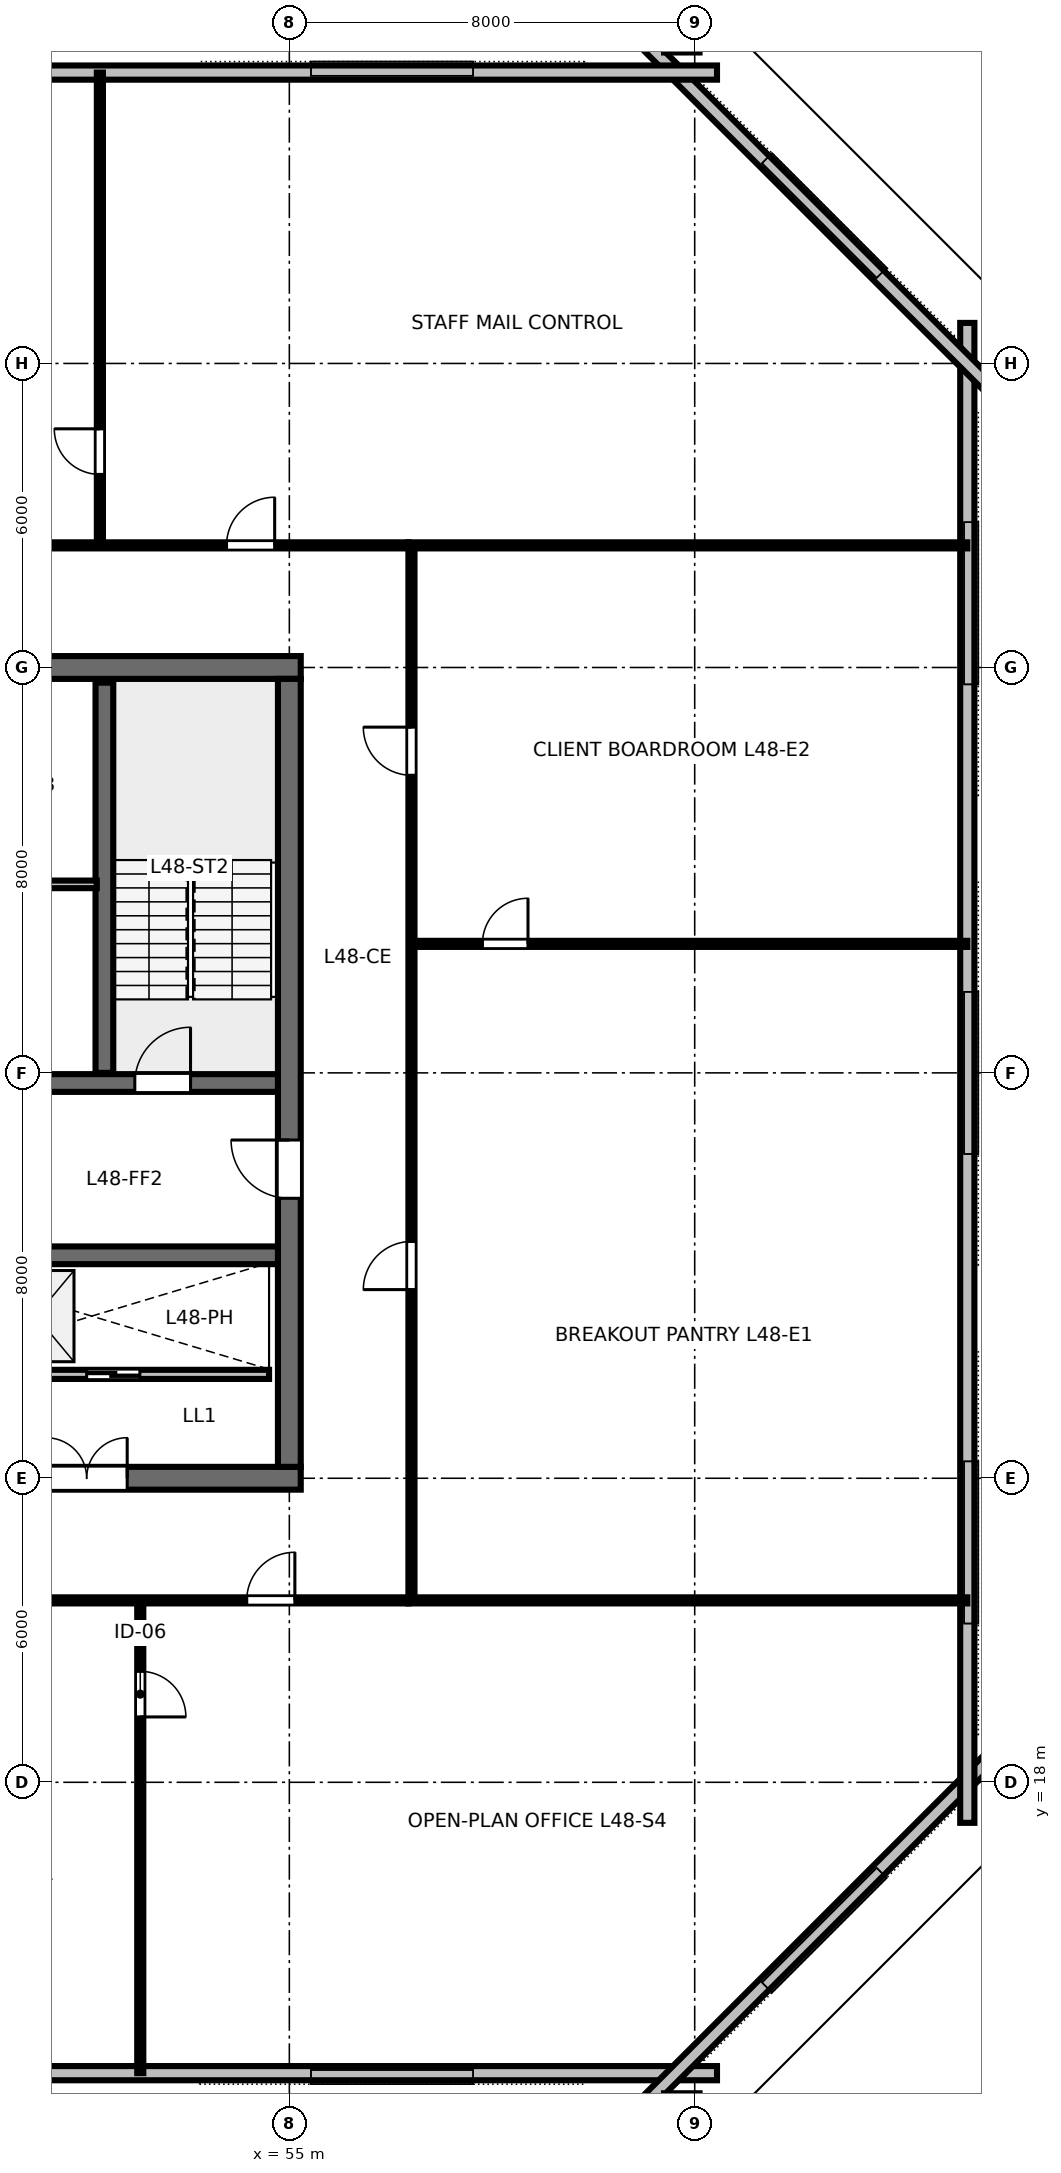
"""IFC4 building model, lengths in metres.
Left out: names, types, materials, properties, quantities, classifications, styles, units other than length and angle.
Written with IfcOpenShell. Run it as: python <this file> out.ifc"""

import sys

from ifc_helpers import new_model, si_unit, direction, frame, frame_2d, origin, origin_2d, place, context, subcontext, project, spatial, rectangle, hollow_rectangle, i_section, extrude, element, fill, save


model = new_model("IFC4")
c1 = context("Model", 3, precision=1e-05, world=origin(), true_north=direction((0.0, 1.0)))
c2 = subcontext(c1, "Body", "Model", "MODEL_VIEW")
j1 = project(units=[si_unit("LENGTHUNIT", "METRE"), si_unit("PLANEANGLEUNIT", "RADIAN")], contexts=[c1])
p1 = place(None, origin())
s1 = spatial("IfcSite", under=j1, at=p1, CompositionType="ELEMENT")
p2 = place(p1, origin())
s2 = spatial("IfcBuilding", under=s1, at=p2, CompositionType="ELEMENT")
p3 = place(p2, frame((0.0, 0.0, 184.2)))
s3 = spatial("IfcBuildingStorey", under=s2, at=p3, CompositionType="ELEMENT", Elevation=184.2)
p4 = place(p3, frame((36.775, 24.0, 0.0), z_axis=(0.0, 0.0, 1.0), x_axis=(1.0, 0.0, 0.0)))
e1 = element("IfcWall", 1, at=p4, inside=s3, PredefinedType="SHEAR", context=c2, shape_type="SweptSolid", body=[
    extrude(rectangle(XDim=18.45, YDim=0.45, at=frame_2d((9.225, 0.0))), origin(), (0.0, 0.0, 1.0), 3.36),
])
p5 = place(p4, frame((13.425, 0.0, 0.0)))
e2 = element("IfcOpeningElement", 2, at=p5, cuts=e1, PredefinedType="OPENING", context=c2, shape_type="SweptSolid", body=[
    extrude(rectangle(XDim=1.6, YDim=2.15, at=frame_2d((0.8, 1.075))), frame((0.0, 0.235, 0.0), z_axis=(0.0, -1.0, 0.0), x_axis=(1.0, 0.0, 0.0)), (0.0, 0.0, 1.0), 0.47),
])
p6 = place(p3, frame((36.775, 40.0, 0.0), z_axis=(0.0, 0.0, 1.0), x_axis=(1.0, 0.0, 0.0)))
e3 = element("IfcWall", 3, at=p6, inside=s3, PredefinedType="SHEAR", context=c2, shape_type="SweptSolid", body=[
    extrude(rectangle(XDim=18.45, YDim=0.45, at=frame_2d((9.225, 0.0))), origin(), (0.0, 0.0, 1.0), 3.36),
])
p7 = place(p6, frame((8.725, 0.0, 0.0)))
e4 = element("IfcOpeningElement", 4, at=p7, cuts=e3, PredefinedType="OPENING", context=c2, shape_type="SweptSolid", body=[
    extrude(rectangle(XDim=1.0, YDim=2.15, at=frame_2d((0.5, 1.075))), frame((0.0, 0.235, 0.0), z_axis=(0.0, -1.0, 0.0), x_axis=(1.0, 0.0, 0.0)), (0.0, 0.0, 1.0), 0.47),
])
p8 = place(p3, frame((55.0, 24.225, 0.0), z_axis=(0.0, 0.0, 1.0), x_axis=(0.0, 1.0, 0.0)))
e5 = element("IfcWall", 5, at=p8, inside=s3, PredefinedType="SHEAR", context=c2, shape_type="SweptSolid", body=[
    extrude(rectangle(XDim=15.55, YDim=0.45, at=frame_2d((7.775, 0.0))), origin(), (0.0, 0.0, 1.0), 3.36),
])
p9 = place(p8, frame((5.3, 0.0, 0.0)))
e6 = element("IfcOpeningElement", 6, at=p9, cuts=e5, PredefinedType="OPENING", context=c2, shape_type="SweptSolid", body=[
    extrude(rectangle(XDim=1.15, YDim=2.15, at=frame_2d((0.575, 1.075))), frame((0.0, 0.235, 0.0), z_axis=(0.0, -1.0, 0.0), x_axis=(1.0, 0.0, 0.0)), (0.0, 0.0, 1.0), 0.47),
])
p10 = place(p3, frame((37.225, 31.8, 0.0), z_axis=(0.0, 0.0, 1.0), x_axis=(1.0, 0.0, 0.0)))
e7 = element("IfcWall", 7, at=p10, inside=s3, PredefinedType="SHEAR", context=c2, shape_type="SweptSolid", body=[
    extrude(rectangle(XDim=17.55, YDim=0.35, at=frame_2d((8.775, 0.0))), origin(), (0.0, 0.0, 1.0), 3.36),
])
p11 = place(p10, frame((0.825, 0.0, 0.0)))
e8 = element("IfcOpeningElement", 8, at=p11, cuts=e7, PredefinedType="OPENING", context=c2, shape_type="SweptSolid", body=[
    extrude(rectangle(XDim=1.1, YDim=2.15, at=frame_2d((0.55, 1.075))), frame((0.0, 0.185, 0.0), z_axis=(0.0, -1.0, 0.0), x_axis=(1.0, 0.0, 0.0)), (0.0, 0.0, 1.0), 0.37),
])
p12 = place(p10, frame((14.725, 0.0, 0.0)))
e9 = element("IfcOpeningElement", 9, at=p12, cuts=e7, PredefinedType="OPENING", context=c2, shape_type="SweptSolid", body=[
    extrude(rectangle(XDim=1.1, YDim=2.15, at=frame_2d((0.55, 1.075))), frame((0.0, 0.185, 0.0), z_axis=(0.0, -1.0, 0.0), x_axis=(1.0, 0.0, 0.0)), (0.0, 0.0, 1.0), 0.37),
])
p13 = place(p3, frame((37.225, 28.4, 0.0), z_axis=(0.0, 0.0, 1.0), x_axis=(1.0, 0.0, 0.0)))
e10 = element("IfcWall", 10, at=p13, inside=s3, PredefinedType="SHEAR", context=c2, shape_type="SweptSolid", body=[
    extrude(rectangle(XDim=17.55, YDim=0.35, at=frame_2d((8.775, 0.0))), origin(), (0.0, 0.0, 1.0), 3.36),
])
p14 = place(p3, frame((62.745, 11.438, 0.0), z_axis=(-0.252686968591, 0.187893668889, 0.949128687321), x_axis=(-0.596699148139, -0.802465031394, 0.0)))
e11 = element("IfcColumn", 11, at=p14, inside=s3, PredefinedType="COLUMN", context=c2, shape_type="SweptSolid", body=[
    extrude(hollow_rectangle(XDim=0.7, YDim=0.85, WallThickness=0.04, at=origin_2d()), origin(), (0.0, 0.0, 1.0), 3.538),
])
p15 = place(p3, frame((69.146, 17.816, 0.0), z_axis=(-0.221678120535, 0.219053075792, 0.950197116846), x_axis=(0.67588069394, -0.66787712075, 0.311649545384)))
e12 = element("IfcColumn", 12, at=p15, inside=s3, PredefinedType="COLUMN", context=c2, shape_type="SweptSolid", body=[
    extrude(hollow_rectangle(XDim=0.7, YDim=0.85, WallThickness=0.04, at=origin_2d()), origin(), (0.0, 0.0, 1.0), 3.534),
])
p16 = place(p3, frame((69.04, 32.0, 0.0), z_axis=(-0.226255694856, 0.0, 0.974067944522), x_axis=(0.974067944522, 0.0, 0.226255694856)))
e13 = element("IfcColumn", 13, at=p16, inside=s3, PredefinedType="COLUMN", context=c2, shape_type="SweptSolid", body=[
    extrude(i_section(OverallWidth=0.406, OverallDepth=0.425, WebThickness=0.033, FlangeThickness=0.052, FilletRadius=0.025, at=origin_2d()), origin(), (0.0, 0.0, 1.0), 3.448),
])
p17 = place(p3, frame((69.146, 46.184, 0.0), z_axis=(-0.221678120535, -0.219053075792, 0.950197116846), x_axis=(0.67588069394, 0.66787712075, 0.311649545384)))
e14 = element("IfcColumn", 14, at=p17, inside=s3, PredefinedType="COLUMN", context=c2, shape_type="SweptSolid", body=[
    extrude(hollow_rectangle(XDim=0.7, YDim=0.85, WallThickness=0.04, at=origin_2d()), origin(), (0.0, 0.0, 1.0), 3.534),
])
p18 = place(p3, frame((62.745, 52.562, 0.0), z_axis=(-0.252686968591, -0.187893668889, 0.949128687321), x_axis=(0.596699148139, -0.802465031394, 0.0)))
e15 = element("IfcColumn", 15, at=p18, inside=s3, PredefinedType="COLUMN", context=c2, shape_type="SweptSolid", body=[
    extrude(hollow_rectangle(XDim=0.7, YDim=0.85, WallThickness=0.04, at=origin_2d()), origin(), (0.0, 0.0, 1.0), 3.538),
])
p19 = place(p3, frame((28.56, 12.26, 0.0), z_axis=(0.0, 0.0, 1.0), x_axis=(1.0, 0.0, 0.0)))
e16 = element("IfcWall", 16, at=p19, inside=s3, PredefinedType="STANDARD", context=c2, shape_type="SweptSolid", body=[
    extrude(rectangle(XDim=34.88, YDim=0.28, at=frame_2d((17.44, 0.0))), origin(), (0.0, 0.0, 1.0), 2.817),
])
p20 = place(p3, frame((62.054, 11.686, 0.0), z_axis=(0.0, 0.0, 1.0), x_axis=(0.707106781187, 0.707106781187, 0.0)))
e17 = element("IfcWall", 17, at=p20, inside=s3, PredefinedType="STANDARD", context=c2, shape_type="SweptSolid", body=[
    extrude(rectangle(XDim=9.757, YDim=0.28, at=frame_2d((4.879, 0.0))), origin(), (0.0, 0.0, 1.0), 3.36),
])
p21 = place(p3, frame((68.38, 17.2, 0.0), z_axis=(0.0, 0.0, 1.0), x_axis=(0.0, 1.0, 0.0)))
e18 = element("IfcWall", 18, at=p21, inside=s3, PredefinedType="STANDARD", context=c2, shape_type="SweptSolid", body=[
    extrude(rectangle(XDim=29.6, YDim=0.28, at=frame_2d((14.8, 0.0))), origin(), (0.0, 0.0, 1.0), 2.817),
])
p22 = place(p3, frame((68.954, 45.415, 0.0), z_axis=(0.0, 0.0, 1.0), x_axis=(-0.707106781187, 0.707106781187, 0.0)))
e19 = element("IfcWall", 19, at=p22, inside=s3, PredefinedType="STANDARD", context=c2, shape_type="SweptSolid", body=[
    extrude(rectangle(XDim=9.757, YDim=0.28, at=frame_2d((4.879, 0.0))), origin(), (0.0, 0.0, 1.0), 3.36),
])
p23 = place(p3, frame((63.44, 51.74, 0.0), z_axis=(0.0, 0.0, 1.0), x_axis=(-1.0, 0.0, 0.0)))
e20 = element("IfcWall", 20, at=p23, inside=s3, PredefinedType="STANDARD", context=c2, shape_type="SweptSolid", body=[
    extrude(rectangle(XDim=34.88, YDim=0.28, at=frame_2d((17.44, 0.0))), origin(), (0.0, 0.0, 1.0), 2.817),
])
p24 = place(p3, frame((51.35, 32.0, 0.0), z_axis=(0.0, 0.0, 1.0), x_axis=(0.0, 1.0, 0.0)))
e21 = element("IfcWall", 21, at=p24, inside=s3, PredefinedType="SHEAR", context=c2, shape_type="SweptSolid", body=[
    extrude(rectangle(XDim=7.7, YDim=0.35, at=frame_2d((3.85, 0.0))), origin(), (0.0, 0.0, 1.0), 3.6),
])
p25 = place(p3, frame((40.8, 35.72, 0.0), z_axis=(0.0, 0.0, 1.0), x_axis=(1.0, 0.0, 0.0)))
e22 = element("IfcWall", 22, at=p25, inside=s3, PredefinedType="PARTITIONING", context=c2, shape_type="SweptSolid", body=[
    extrude(rectangle(XDim=10.4, YDim=0.15, at=frame_2d((5.2, 0.0))), origin(), (0.0, 0.0, 1.0), 3.36),
])
p26 = place(p25, frame((4.9, 0.0, 0.0)))
e23 = element("IfcOpeningElement", 23, at=p26, cuts=e22, PredefinedType="OPENING", context=c2, shape_type="SweptSolid", body=[
    extrude(rectangle(XDim=0.9, YDim=2.15, at=frame_2d((0.45, 1.075))), frame((0.0, 0.085, 0.0), z_axis=(0.0, -1.0, 0.0), x_axis=(1.0, 0.0, 0.0)), (0.0, 0.0, 1.0), 0.17),
])
p27 = place(p3, frame((47.6, 26.05, 0.0), z_axis=(0.0, 0.0, 1.0), x_axis=(1.0, 0.0, 0.0)))
e24 = element("IfcWall", 24, at=p27, inside=s3, PredefinedType="PARTITIONING", context=c2, shape_type="SweptSolid", body=[
    extrude(rectangle(XDim=7.0, YDim=0.18, at=frame_2d((3.5, 0.0))), origin(), (0.0, 0.0, 1.0), 3.36),
])
p28 = place(p27, frame((1.2, 0.0, 0.0)))
e25 = element("IfcOpeningElement", 25, at=p28, cuts=e24, PredefinedType="OPENING", context=c2, shape_type="SweptSolid", body=[
    extrude(rectangle(XDim=1.05, YDim=2.15, at=frame_2d((0.525, 1.075))), frame((0.0, 0.1, 0.0), z_axis=(0.0, -1.0, 0.0), x_axis=(1.0, 0.0, 0.0)), (0.0, 0.0, 1.0), 0.2),
])
p29 = place(p27, frame((3.4, 0.0, 0.0)))
e26 = element("IfcOpeningElement", 26, at=p29, cuts=e24, PredefinedType="OPENING", context=c2, shape_type="SweptSolid", body=[
    extrude(rectangle(XDim=1.05, YDim=2.15, at=frame_2d((0.525, 1.075))), frame((0.0, 0.1, 0.0), z_axis=(0.0, -1.0, 0.0), x_axis=(1.0, 0.0, 0.0)), (0.0, 0.0, 1.0), 0.2),
])
p30 = place(p3, frame((52.058, 21.59, 0.0), z_axis=(0.0, 0.0, 1.0), x_axis=(0.0, -1.0, 0.0)))
e27 = element("IfcWall", 27, at=p30, inside=s3, PredefinedType="PARTITIONING", context=c2, shape_type="SweptSolid", body=[
    extrude(rectangle(XDim=9.33, YDim=0.12, at=frame_2d((4.665, 0.0))), origin(), (0.0, 0.0, 1.0), 2.64),
])
p31 = place(p30, frame((1.4, 0.0, 0.0)))
e28 = element("IfcOpeningElement", 28, at=p31, cuts=e27, PredefinedType="OPENING", context=c2, shape_type="SweptSolid", body=[
    extrude(rectangle(XDim=0.9, YDim=2.15, at=frame_2d((0.45, 1.075))), frame((0.0, 0.07, 0.0), z_axis=(0.0, -1.0, 0.0), x_axis=(1.0, 0.0, 0.0)), (0.0, 0.0, 1.0), 0.14),
])
p32 = place(p3, frame((47.02, 21.59, 0.0), z_axis=(0.0, 0.0, 1.0), x_axis=(1.0, 0.0, 0.0)))
e29 = element("IfcWall", 29, at=p32, inside=s3, PredefinedType="PARTITIONING", context=c2, shape_type="SweptSolid", body=[
    extrude(rectangle(XDim=10.33, YDim=0.12, at=frame_2d((5.165, 0.0))), origin(), (0.0, 0.0, 1.0), 2.64),
])
p33 = place(p32, frame((2.044, 0.0, 0.0)))
e30 = element("IfcOpeningElement", 30, at=p33, cuts=e29, PredefinedType="OPENING", context=c2, shape_type="SweptSolid", body=[
    extrude(rectangle(XDim=0.95, YDim=2.15, at=frame_2d((0.475, 1.075))), frame((0.0, 0.07, 0.0), z_axis=(0.0, -1.0, 0.0), x_axis=(1.0, 0.0, 0.0)), (0.0, 0.0, 1.0), 0.14),
])
p34 = place(p32, frame((7.139, 0.0, 0.0)))
e31 = element("IfcOpeningElement", 31, at=p34, cuts=e29, PredefinedType="OPENING", context=c2, shape_type="SweptSolid", body=[
    extrude(rectangle(XDim=0.95, YDim=2.15, at=frame_2d((0.475, 1.075))), frame((0.0, 0.07, 0.0), z_axis=(0.0, -1.0, 0.0), x_axis=(1.0, 0.0, 0.0)), (0.0, 0.0, 1.0), 0.14),
])
p35 = place(p3, frame((51.261, 42.41, 0.0), z_axis=(0.0, 0.0, 1.0), x_axis=(0.0, 1.0, 0.0)))
e32 = element("IfcWall", 32, at=p35, inside=s3, PredefinedType="PARTITIONING", context=c2, shape_type="SweptSolid", body=[
    extrude(rectangle(XDim=9.33, YDim=0.12, at=frame_2d((4.665, 0.0))), origin(), (0.0, 0.0, 1.0), 2.64),
])
p36 = place(p35, frame((1.4, 0.0, 0.0)))
e33 = element("IfcOpeningElement", 33, at=p36, cuts=e32, PredefinedType="OPENING", context=c2, shape_type="SweptSolid", body=[
    extrude(rectangle(XDim=0.9, YDim=2.15, at=frame_2d((0.45, 1.075))), frame((0.0, 0.07, 0.0), z_axis=(0.0, -1.0, 0.0), x_axis=(1.0, 0.0, 0.0)), (0.0, 0.0, 1.0), 0.14),
])
p37 = place(p3, frame((47.02, 42.41, 0.0), z_axis=(0.0, 0.0, 1.0), x_axis=(1.0, 0.0, 0.0)))
e34 = element("IfcWall", 34, at=p37, inside=s3, PredefinedType="PARTITIONING", context=c2, shape_type="SweptSolid", body=[
    extrude(rectangle(XDim=10.33, YDim=0.12, at=frame_2d((5.165, 0.0))), origin(), (0.0, 0.0, 1.0), 2.64),
])
p38 = place(p37, frame((1.709, 0.0, 0.0)))
e35 = element("IfcOpeningElement", 35, at=p38, cuts=e34, PredefinedType="OPENING", context=c2, shape_type="SweptSolid", body=[
    extrude(rectangle(XDim=0.95, YDim=2.15, at=frame_2d((0.475, 1.075))), frame((0.0, 0.07, 0.0), z_axis=(0.0, -1.0, 0.0), x_axis=(1.0, 0.0, 0.0)), (0.0, 0.0, 1.0), 0.14),
])
p39 = place(p37, frame((6.74, 0.0, 0.0)))
e36 = element("IfcOpeningElement", 36, at=p39, cuts=e34, PredefinedType="OPENING", context=c2, shape_type="SweptSolid", body=[
    extrude(rectangle(XDim=0.95, YDim=2.15, at=frame_2d((0.475, 1.075))), frame((0.0, 0.07, 0.0), z_axis=(0.0, -1.0, 0.0), x_axis=(1.0, 0.0, 0.0)), (0.0, 0.0, 1.0), 0.14),
])
p40 = place(p3, frame((57.41, 34.546, 0.0), z_axis=(0.0, 0.0, 1.0), x_axis=(1.0, 0.0, 0.0)))
e37 = element("IfcWall", 37, at=p40, inside=s3, PredefinedType="PARTITIONING", context=c2, shape_type="SweptSolid", body=[
    extrude(rectangle(XDim=10.97, YDim=0.12, at=frame_2d((5.485, 0.0))), origin(), (0.0, 0.0, 1.0), 2.64),
])
p41 = place(p40, frame((1.4, 0.0, 0.0)))
e38 = element("IfcOpeningElement", 38, at=p41, cuts=e37, PredefinedType="OPENING", context=c2, shape_type="SweptSolid", body=[
    extrude(rectangle(XDim=0.9, YDim=2.15, at=frame_2d((0.45, 1.075))), frame((0.0, 0.07, 0.0), z_axis=(0.0, -1.0, 0.0), x_axis=(1.0, 0.0, 0.0)), (0.0, 0.0, 1.0), 0.14),
])
p42 = place(p3, frame((57.41, 21.65, 0.0), z_axis=(0.0, 0.0, 1.0), x_axis=(0.0, 1.0, 0.0)))
e39 = element("IfcWall", 39, at=p42, inside=s3, PredefinedType="PARTITIONING", context=c2, shape_type="SweptSolid", body=[
    extrude(rectangle(XDim=20.7, YDim=0.12, at=frame_2d((10.35, 0.0))), origin(), (0.0, 0.0, 1.0), 2.64),
])
p43 = place(p42, frame((6.073, 0.0, 0.0)))
e40 = element("IfcOpeningElement", 40, at=p43, cuts=e39, PredefinedType="OPENING", context=c2, shape_type="SweptSolid", body=[
    extrude(rectangle(XDim=0.95, YDim=2.15, at=frame_2d((0.475, 1.075))), frame((0.0, 0.07, 0.0), z_axis=(0.0, -1.0, 0.0), x_axis=(1.0, 0.0, 0.0)), (0.0, 0.0, 1.0), 0.14),
])
p44 = place(p42, frame((16.223, 0.0, 0.0)))
e41 = element("IfcOpeningElement", 41, at=p44, cuts=e39, PredefinedType="OPENING", context=c2, shape_type="SweptSolid", body=[
    extrude(rectangle(XDim=0.95, YDim=2.15, at=frame_2d((0.475, 1.075))), frame((0.0, 0.07, 0.0), z_axis=(0.0, -1.0, 0.0), x_axis=(1.0, 0.0, 0.0)), (0.0, 0.0, 1.0), 0.14),
])
for number, where, z_axis, x_axis in (
    (42, (57.35, 21.59, 0.0), (0.0, 0.0, 1.0), (1.0, 0.0, 0.0)),
    (43, (57.35, 42.41, 0.0), (0.0, 0.0, 1.0), (1.0, 0.0, 0.0)),
):
    element("IfcWall", number, at=place(p3, frame(where, z_axis=z_axis, x_axis=x_axis)), inside=s3, PredefinedType="PARTITIONING", context=c2, shape_type="SweptSolid", body=[
        extrude(rectangle(XDim=11.03, YDim=0.12, at=frame_2d((5.515, 0.0))), origin(), (0.0, 0.0, 1.0), 2.64),
    ])
p45 = place(p12, origin())
e44 = element("IfcDoor", 44, at=p45, inside=s3, OperationType="SINGLE_SWING_RIGHT", PredefinedType="DOOR", context=c2, shape_type="SweptSolid", body=[
    extrude(rectangle(XDim=1.1, YDim=2.15, at=frame_2d((0.55, 1.075))), frame((0.0, 0.025, 0.0), z_axis=(0.0, -1.0, 0.0), x_axis=(1.0, 0.0, 0.0)), (0.0, 0.0, 1.0), 0.05),
])
fill(e9, e44)
p46 = place(p9, origin())
e45 = element("IfcDoor", 45, at=p46, inside=s3, OperationType="SINGLE_SWING_RIGHT", PredefinedType="DOOR", context=c2, shape_type="SweptSolid", body=[
    extrude(rectangle(XDim=1.15, YDim=2.15, at=frame_2d((0.575, 1.075))), frame((0.0, 0.025, 0.0), z_axis=(0.0, -1.0, 0.0), x_axis=(1.0, 0.0, 0.0)), (0.0, 0.0, 1.0), 0.05),
])
fill(e6, e45)
p47 = place(p5, origin())
e46 = element("IfcDoor", 46, at=p47, inside=s3, OperationType="DOUBLE_DOOR_SINGLE_SWING", PredefinedType="DOOR", context=c2, shape_type="SweptSolid", body=[
    extrude(rectangle(XDim=1.6, YDim=2.15, at=frame_2d((0.8, 1.075))), frame((0.0, 0.025, 0.0), z_axis=(0.0, -1.0, 0.0), x_axis=(1.0, 0.0, 0.0)), (0.0, 0.0, 1.0), 0.05),
])
fill(e2, e46)
p48 = place(p29, origin())
e47 = element("IfcDoor", 47, at=p48, inside=s3, OperationType="SLIDING_TO_RIGHT", PredefinedType="DOOR", context=c2, shape_type="SweptSolid", body=[
    extrude(rectangle(XDim=1.05, YDim=2.15, at=frame_2d((0.525, 1.075))), frame((0.0, 0.025, 0.0), z_axis=(0.0, -1.0, 0.0), x_axis=(1.0, 0.0, 0.0)), (0.0, 0.0, 1.0), 0.05),
])
fill(e26, e47)
p49 = place(p31, origin())
e48 = element("IfcDoor", 48, at=p49, inside=s3, OperationType="SINGLE_SWING_RIGHT", PredefinedType="DOOR", context=c2, shape_type="SweptSolid", body=[
    extrude(rectangle(XDim=0.9, YDim=2.15, at=frame_2d((0.45, 1.075))), frame((0.0, 0.025, 0.0), z_axis=(0.0, -1.0, 0.0), x_axis=(1.0, 0.0, 0.0)), (0.0, 0.0, 1.0), 0.05),
])
fill(e28, e48)
p50 = place(p34, origin())
e49 = element("IfcDoor", 49, at=p50, inside=s3, OperationType="SINGLE_SWING_RIGHT", PredefinedType="DOOR", context=c2, shape_type="SweptSolid", body=[
    extrude(rectangle(XDim=0.95, YDim=2.15, at=frame_2d((0.475, 1.075))), frame((0.0, 0.025, 0.0), z_axis=(0.0, -1.0, 0.0), x_axis=(1.0, 0.0, 0.0)), (0.0, 0.0, 1.0), 0.05),
])
fill(e31, e49)
p51 = place(p36, origin())
e50 = element("IfcDoor", 50, at=p51, inside=s3, OperationType="SINGLE_SWING_RIGHT", PredefinedType="DOOR", context=c2, shape_type="SweptSolid", body=[
    extrude(rectangle(XDim=0.9, YDim=2.15, at=frame_2d((0.45, 1.075))), frame((0.0, 0.025, 0.0), z_axis=(0.0, -1.0, 0.0), x_axis=(1.0, 0.0, 0.0)), (0.0, 0.0, 1.0), 0.05),
])
fill(e33, e50)
p52 = place(p39, origin())
e51 = element("IfcDoor", 51, at=p52, inside=s3, OperationType="SINGLE_SWING_RIGHT", PredefinedType="DOOR", context=c2, shape_type="SweptSolid", body=[
    extrude(rectangle(XDim=0.95, YDim=2.15, at=frame_2d((0.475, 1.075))), frame((0.0, 0.025, 0.0), z_axis=(0.0, -1.0, 0.0), x_axis=(1.0, 0.0, 0.0)), (0.0, 0.0, 1.0), 0.05),
])
fill(e36, e51)
p53 = place(p41, origin())
e52 = element("IfcDoor", 52, at=p53, inside=s3, OperationType="SINGLE_SWING_RIGHT", PredefinedType="DOOR", context=c2, shape_type="SweptSolid", body=[
    extrude(rectangle(XDim=0.9, YDim=2.15, at=frame_2d((0.45, 1.075))), frame((0.0, 0.025, 0.0), z_axis=(0.0, -1.0, 0.0), x_axis=(1.0, 0.0, 0.0)), (0.0, 0.0, 1.0), 0.05),
])
fill(e38, e52)
p54 = place(p43, origin())
e53 = element("IfcDoor", 53, at=p54, inside=s3, OperationType="SINGLE_SWING_LEFT", PredefinedType="DOOR", context=c2, shape_type="SweptSolid", body=[
    extrude(rectangle(XDim=0.95, YDim=2.15, at=frame_2d((0.475, 1.075))), frame((0.0, 0.025, 0.0), z_axis=(0.0, -1.0, 0.0), x_axis=(1.0, 0.0, 0.0)), (0.0, 0.0, 1.0), 0.05),
])
fill(e40, e53)
p55 = place(p44, origin())
e54 = element("IfcDoor", 54, at=p55, inside=s3, OperationType="SINGLE_SWING_RIGHT", PredefinedType="DOOR", context=c2, shape_type="SweptSolid", body=[
    extrude(rectangle(XDim=0.95, YDim=2.15, at=frame_2d((0.475, 1.075))), frame((0.0, 0.025, 0.0), z_axis=(0.0, -1.0, 0.0), x_axis=(1.0, 0.0, 0.0)), (0.0, 0.0, 1.0), 0.05),
])
fill(e41, e54)
save(model, sys.argv[1])
